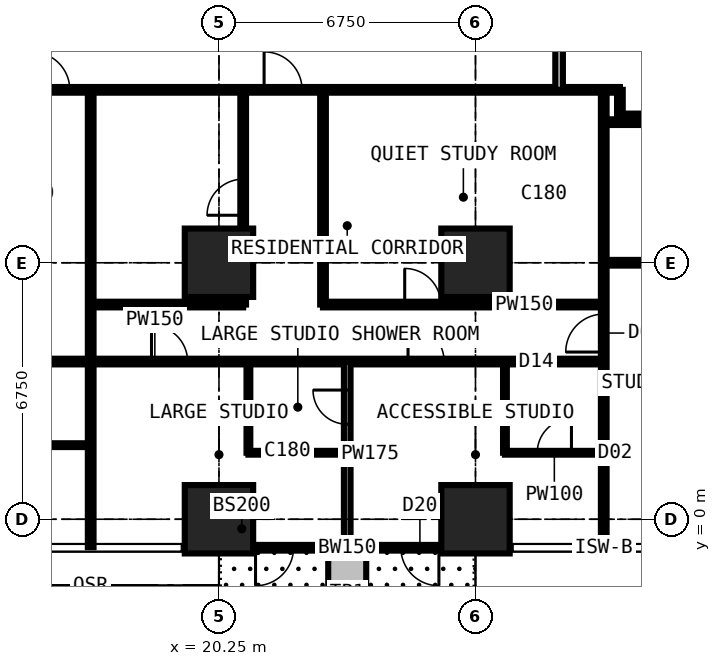
"""IFC4 building model, lengths in metres.
Left out: names, types, materials, properties, quantities, classifications, styles, units other than length and angle.
Written with IfcOpenShell. Run it as: python <this file> out.ifc"""

import sys

from ifc_helpers import new_model, si_unit, direction, frame, frame_2d, origin, origin_2d, place, context, subcontext, project, spatial, rectangle, extrude, element, fill, save


model = new_model("IFC4")
c1 = context("Model", 3, precision=1e-05, world=origin(), true_north=direction((0.0, 1.0)))
c2 = subcontext(c1, "Body", "Model", "MODEL_VIEW")
j1 = project(units=[si_unit("LENGTHUNIT", "METRE"), si_unit("PLANEANGLEUNIT", "RADIAN")], contexts=[c1])
p1 = place(None, origin())
s1 = spatial("IfcSite", under=j1, at=p1, CompositionType="ELEMENT")
p2 = place(p1, origin())
s2 = spatial("IfcBuilding", under=s1, at=p2, CompositionType="ELEMENT")
p3 = place(p2, frame((0.0, 0.0, 98.1)))
s3 = spatial("IfcBuildingStorey", under=s2, at=p3, CompositionType="ELEMENT", Elevation=98.1)
for number, where, z_axis, x_axis in (
    (1, (20.25, 0.0, 0.0), (0.0, 0.0, 1.0), (1.0, 0.0, 0.0)),
    (2, (20.25, 6.75, 0.0), (0.0, 0.0, 1.0), (1.0, 0.0, 0.0)),
    (3, (27.0, 0.0, 0.0), (0.0, 0.0, 1.0), (1.0, 0.0, 0.0)),
    (4, (27.0, 6.75, 0.0), (0.0, 0.0, 1.0), (1.0, 0.0, 0.0)),
):
    element("IfcColumn", number, at=place(p3, frame(where, z_axis=z_axis, x_axis=x_axis)), inside=s3, PredefinedType="COLUMN", context=c2, shape_type="SweptSolid", body=[
        extrude(rectangle(XDim=1.8, YDim=1.8, at=origin_2d()), origin(), (0.0, 0.0, 1.0), 3.6),
    ])
p4 = place(p3, frame((27.0, -0.75, 0.0), z_axis=(0.0, 0.0, 1.0), x_axis=(-1.0, 0.0, 0.0)))
e5 = element("IfcWall", 5, at=p4, inside=s3, PredefinedType="SOLIDWALL", context=c2, shape_type="SweptSolid", body=[
    extrude(rectangle(XDim=6.75, YDim=0.15, at=frame_2d((3.375, 0.0))), origin(), (0.0, 0.0, 1.0), 3.375),
])
p5 = place(p4, frame((0.962, 0.0, 0.0)))
e6 = element("IfcOpeningElement", 6, at=p5, cuts=e5, PredefinedType="OPENING", context=c2, shape_type="SweptSolid", body=[
    extrude(rectangle(XDim=1.0, YDim=2.2, at=frame_2d((0.5, 1.1))), frame((0.0, 0.085, 0.0), z_axis=(0.0, -1.0, 0.0), x_axis=(1.0, 0.0, 0.0)), (0.0, 0.0, 1.0), 0.17),
])
p6 = place(p4, frame((2.025, 0.0, 0.9)))
e7 = element("IfcOpeningElement", 7, at=p6, cuts=e5, PredefinedType="OPENING", context=c2, shape_type="SweptSolid", body=[
    extrude(rectangle(XDim=1.2, YDim=1.8, at=frame_2d((0.6, 0.9))), frame((0.0, 0.085, 0.0), z_axis=(0.0, -1.0, 0.0), x_axis=(1.0, 0.0, 0.0)), (0.0, 0.0, 1.0), 0.17),
])
p7 = place(p4, frame((4.788, 0.0, 0.0)))
e8 = element("IfcOpeningElement", 8, at=p7, cuts=e5, PredefinedType="OPENING", context=c2, shape_type="SweptSolid", body=[
    extrude(rectangle(XDim=1.0, YDim=2.2, at=frame_2d((0.5, 1.1))), frame((0.0, 0.085, 0.0), z_axis=(0.0, -1.0, 0.0), x_axis=(1.0, 0.0, 0.0)), (0.0, 0.0, 1.0), 0.17),
])
p8 = place(p4, frame((3.525, 0.0, 0.9)))
e9 = element("IfcOpeningElement", 9, at=p8, cuts=e5, PredefinedType="OPENING", context=c2, shape_type="SweptSolid", body=[
    extrude(rectangle(XDim=1.2, YDim=1.8, at=frame_2d((0.6, 0.9))), frame((0.0, 0.085, 0.0), z_axis=(0.0, -1.0, 0.0), x_axis=(1.0, 0.0, 0.0)), (0.0, 0.0, 1.0), 0.17),
])
p9 = place(p3, frame((23.625, -0.85, 0.0), z_axis=(0.0, 0.0, 1.0), x_axis=(0.0, -1.0, 0.0)))
e10 = element("IfcWall", 10, at=p9, inside=s3, PredefinedType="USERDEFINED", context=c2, shape_type="SweptSolid", body=[
    extrude(rectangle(XDim=2.2, YDim=1.0, at=frame_2d((1.1, 0.0))), origin(), (0.0, 0.0, 1.0), 0.9),
])
p10 = place(p3, frame((6.75, 4.15, 0.0), z_axis=(0.0, 0.0, 1.0), x_axis=(1.0, 0.0, 0.0)))
e11 = element("IfcWall", 11, at=p10, inside=s3, PredefinedType="PARTITIONING", context=c2, shape_type="SweptSolid", body=[
    extrude(rectangle(XDim=23.625, YDim=0.15, at=frame_2d((11.812, 0.0))), origin(), (0.0, 0.0, 1.0), 3.375),
])
p11 = place(p10, frame((1.2, 0.0, 0.0)))
e12 = element("IfcOpeningElement", 12, at=p11, cuts=e11, PredefinedType="OPENING", context=c2, shape_type="SweptSolid", body=[
    extrude(rectangle(XDim=1.0, YDim=2.2, at=frame_2d((0.5, 1.1))), frame((0.0, 0.085, 0.0), z_axis=(0.0, -1.0, 0.0), x_axis=(1.0, 0.0, 0.0)), (0.0, 0.0, 1.0), 0.17),
])
p12 = place(p10, frame((3.575, 0.0, 0.0)))
e13 = element("IfcOpeningElement", 13, at=p12, cuts=e11, PredefinedType="OPENING", context=c2, shape_type="SweptSolid", body=[
    extrude(rectangle(XDim=0.95, YDim=2.2, at=frame_2d((0.475, 1.1))), frame((0.0, 0.085, 0.0), z_axis=(0.0, -1.0, 0.0), x_axis=(1.0, 0.0, 0.0)), (0.0, 0.0, 1.0), 0.17),
])
p13 = place(p10, frame((7.0, 0.0, 0.0)))
e14 = element("IfcOpeningElement", 14, at=p13, cuts=e11, PredefinedType="OPENING", context=c2, shape_type="SweptSolid", body=[
    extrude(rectangle(XDim=0.95, YDim=2.2, at=frame_2d((0.475, 1.1))), frame((0.0, 0.085, 0.0), z_axis=(0.0, -1.0, 0.0), x_axis=(1.0, 0.0, 0.0)), (0.0, 0.0, 1.0), 0.17),
])
p14 = place(p10, frame((18.475, 0.0, 0.0)))
e15 = element("IfcOpeningElement", 15, at=p14, cuts=e11, PredefinedType="OPENING", context=c2, shape_type="SweptSolid", body=[
    extrude(rectangle(XDim=0.95, YDim=2.2, at=frame_2d((0.475, 1.1))), frame((0.0, 0.085, 0.0), z_axis=(0.0, -1.0, 0.0), x_axis=(1.0, 0.0, 0.0)), (0.0, 0.0, 1.0), 0.17),
])
p15 = place(p10, frame((11.725, 0.0, 0.0)))
e16 = element("IfcOpeningElement", 16, at=p15, cuts=e11, PredefinedType="OPENING", context=c2, shape_type="SweptSolid", body=[
    extrude(rectangle(XDim=0.95, YDim=2.2, at=frame_2d((0.475, 1.1))), frame((0.0, 0.085, 0.0), z_axis=(0.0, -1.0, 0.0), x_axis=(1.0, 0.0, 0.0)), (0.0, 0.0, 1.0), 0.17),
])
p16 = place(p3, frame((10.125, 11.3, 0.0), z_axis=(0.0, 0.0, 1.0), x_axis=(1.0, 0.0, 0.0)))
e17 = element("IfcWall", 17, at=p16, inside=s3, PredefinedType="PARTITIONING", context=c2, shape_type="SweptSolid", body=[
    extrude(rectangle(XDim=20.675, YDim=0.15, at=frame_2d((10.337, 0.0))), origin(), (0.0, 0.0, 1.0), 3.375),
])
p17 = place(p16, frame((5.2, 0.0, 0.0)))
e18 = element("IfcOpeningElement", 18, at=p17, cuts=e17, PredefinedType="OPENING", context=c2, shape_type="SweptSolid", body=[
    extrude(rectangle(XDim=1.0, YDim=2.2, at=frame_2d((0.5, 1.1))), frame((0.0, 0.085, 0.0), z_axis=(0.0, -1.0, 0.0), x_axis=(1.0, 0.0, 0.0)), (0.0, 0.0, 1.0), 0.17),
])
p18 = place(p16, frame((11.312, 0.0, 0.0)))
e19 = element("IfcOpeningElement", 19, at=p18, cuts=e17, PredefinedType="OPENING", context=c2, shape_type="SweptSolid", body=[
    extrude(rectangle(XDim=1.0, YDim=2.2, at=frame_2d((0.5, 1.1))), frame((0.0, 0.085, 0.0), z_axis=(0.0, -1.0, 0.0), x_axis=(1.0, 0.0, 0.0)), (0.0, 0.0, 1.0), 0.17),
])
p19 = place(p16, frame((3.225, 0.0, 0.0)))
e20 = element("IfcOpeningElement", 20, at=p19, cuts=e17, PredefinedType="OPENING", context=c2, shape_type="SweptSolid", body=[
    extrude(rectangle(XDim=0.95, YDim=2.2, at=frame_2d((0.475, 1.1))), frame((0.0, 0.085, 0.0), z_axis=(0.0, -1.0, 0.0), x_axis=(1.0, 0.0, 0.0)), (0.0, 0.0, 1.0), 0.17),
])
p20 = place(p3, frame((14.875, 1.95, 0.0), z_axis=(0.0, 0.0, 1.0), x_axis=(1.0, 0.0, 0.0)))
e21 = element("IfcWall", 21, at=p20, inside=s3, PredefinedType="PARTITIONING", context=c2, shape_type="SweptSolid", body=[
    extrude(rectangle(XDim=2.0, YDim=0.1, at=frame_2d((1.0, 0.0))), origin(), (0.0, 0.0, 1.0), 3.375),
])
p21 = place(p3, frame((16.875, -0.734, 0.0), z_axis=(0.0, 0.0, 1.0), x_axis=(0.0, 1.0, 0.0)))
e22 = element("IfcWall", 22, at=p21, inside=s3, PredefinedType="PARTITIONING", context=c2, shape_type="SweptSolid", body=[
    extrude(rectangle(XDim=12.034, YDim=0.15, at=frame_2d((6.017, 0.0))), origin(), (0.0, 0.0, 1.0), 3.375),
])
p22 = place(p3, frame((16.875, 5.65, 0.0), z_axis=(0.0, 0.0, 1.0), x_axis=(1.0, 0.0, 0.0)))
e23 = element("IfcWall", 23, at=p22, inside=s3, PredefinedType="PARTITIONING", context=c2, shape_type="SweptSolid", body=[
    extrude(rectangle(XDim=4.012, YDim=0.15, at=frame_2d((2.006, 0.0))), origin(), (0.0, 0.0, 1.0), 3.375),
])
p23 = place(p3, frame((20.887, 5.65, 0.0), z_axis=(0.0, 0.0, 1.0), x_axis=(0.0, 1.0, 0.0)))
e24 = element("IfcWall", 24, at=p23, inside=s3, PredefinedType="PARTITIONING", context=c2, shape_type="SweptSolid", body=[
    extrude(rectangle(XDim=5.65, YDim=0.15, at=frame_2d((2.825, 0.0))), origin(), (0.0, 0.0, 1.0), 3.375),
])
p24 = place(p23, frame((2.35, 0.0, 0.0)))
e25 = element("IfcOpeningElement", 25, at=p24, cuts=e24, PredefinedType="OPENING", context=c2, shape_type="SweptSolid", body=[
    extrude(rectangle(XDim=0.95, YDim=2.2, at=frame_2d((0.475, 1.1))), frame((0.0, 0.085, 0.0), z_axis=(0.0, -1.0, 0.0), x_axis=(1.0, 0.0, 0.0)), (0.0, 0.0, 1.0), 0.17),
])
p25 = place(p3, frame((21.025, 1.75, 0.0), z_axis=(0.0, 0.0, 1.0), x_axis=(0.0, 1.0, 0.0)))
e26 = element("IfcWall", 26, at=p25, inside=s3, PredefinedType="PARTITIONING", context=c2, shape_type="SweptSolid", body=[
    extrude(rectangle(XDim=2.4, YDim=0.1, at=frame_2d((1.2, 0.0))), origin(), (0.0, 0.0, 1.0), 3.375),
])
p26 = place(p3, frame((21.025, 1.75, 0.0), z_axis=(0.0, 0.0, 1.0), x_axis=(1.0, 0.0, 0.0)))
e27 = element("IfcWall", 27, at=p26, inside=s3, PredefinedType="PARTITIONING", context=c2, shape_type="SweptSolid", body=[
    extrude(rectangle(XDim=2.6, YDim=0.1, at=frame_2d((1.3, 0.0))), origin(), (0.0, 0.0, 1.0), 3.375),
])
p27 = place(p3, frame((22.988, 5.65, 0.0), z_axis=(0.0, 0.0, 1.0), x_axis=(1.0, 0.0, 0.0)))
e28 = element("IfcWall", 28, at=p27, inside=s3, PredefinedType="PARTITIONING", context=c2, shape_type="SweptSolid", body=[
    extrude(rectangle(XDim=7.387, YDim=0.15, at=frame_2d((3.694, 0.0))), origin(), (0.0, 0.0, 1.0), 3.375),
])
p28 = place(p27, frame((2.15, 0.0, 0.0)))
e29 = element("IfcOpeningElement", 29, at=p28, cuts=e28, PredefinedType="OPENING", context=c2, shape_type="SweptSolid", body=[
    extrude(rectangle(XDim=0.95, YDim=2.2, at=frame_2d((0.475, 1.1))), frame((0.0, 0.085, 0.0), z_axis=(0.0, -1.0, 0.0), x_axis=(1.0, 0.0, 0.0)), (0.0, 0.0, 1.0), 0.17),
])
p29 = place(p3, frame((22.988, 5.65, 0.0), z_axis=(0.0, 0.0, 1.0), x_axis=(0.0, 1.0, 0.0)))
e30 = element("IfcWall", 30, at=p29, inside=s3, PredefinedType="PARTITIONING", context=c2, shape_type="SweptSolid", body=[
    extrude(rectangle(XDim=5.65, YDim=0.15, at=frame_2d((2.825, 0.0))), origin(), (0.0, 0.0, 1.0), 3.375),
])
p30 = place(p3, frame((23.625, -0.734, 0.0), z_axis=(0.0, 0.0, 1.0), x_axis=(0.0, 1.0, 0.0)))
e31 = element("IfcWall", 31, at=p30, inside=s3, PredefinedType="PARTITIONING", context=c2, shape_type="SweptSolid", body=[
    extrude(rectangle(XDim=4.884, YDim=0.175, at=frame_2d((2.442, 0.0))), origin(), (0.0, 0.0, 1.0), 3.375),
])
p31 = place(p30, frame((3.234, 0.0, 0.0)))
e32 = element("IfcOpeningElement", 32, at=p31, cuts=e31, PredefinedType="OPENING", context=c2, shape_type="SweptSolid", body=[
    extrude(rectangle(XDim=0.9, YDim=2.2, at=frame_2d((0.45, 1.1))), frame((0.0, 0.097, 0.0), z_axis=(0.0, -1.0, 0.0), x_axis=(1.0, 0.0, 0.0)), (0.0, 0.0, 1.0), 0.195),
])
p32 = place(p3, frame((27.775, 1.75, 0.0), z_axis=(0.0, 0.0, 1.0), x_axis=(0.0, 1.0, 0.0)))
e33 = element("IfcWall", 33, at=p32, inside=s3, PredefinedType="PARTITIONING", context=c2, shape_type="SweptSolid", body=[
    extrude(rectangle(XDim=2.4, YDim=0.1, at=frame_2d((1.2, 0.0))), origin(), (0.0, 0.0, 1.0), 3.375),
])
p33 = place(p3, frame((27.775, 1.75, 0.0), z_axis=(0.0, 0.0, 1.0), x_axis=(1.0, 0.0, 0.0)))
e34 = element("IfcWall", 34, at=p33, inside=s3, PredefinedType="PARTITIONING", context=c2, shape_type="SweptSolid", body=[
    extrude(rectangle(XDim=2.6, YDim=0.1, at=frame_2d((1.3, 0.0))), origin(), (0.0, 0.0, 1.0), 3.375),
])
p34 = place(p33, frame((0.85, 0.0, 0.0)))
e35 = element("IfcOpeningElement", 35, at=p34, cuts=e34, PredefinedType="OPENING", context=c2, shape_type="SweptSolid", body=[
    extrude(rectangle(XDim=0.9, YDim=2.2, at=frame_2d((0.45, 1.1))), frame((0.0, 0.06, 0.0), z_axis=(0.0, -1.0, 0.0), x_axis=(1.0, 0.0, 0.0)), (0.0, 0.0, 1.0), 0.12),
])
p35 = place(p3, frame((29.2, 11.3, 0.0), z_axis=(0.0, 0.0, 1.0), x_axis=(0.0, 1.0, 0.0)))
e36 = element("IfcWall", 36, at=p35, inside=s3, PredefinedType="PARTITIONING", context=c2, shape_type="SweptSolid", body=[
    extrude(rectangle(XDim=17.9, YDim=0.2, at=frame_2d((8.95, 0.0))), origin(), (0.0, 0.0, 1.0), 3.375),
])
p36 = place(p35, frame((8.35, 0.0, 0.0)))
e37 = element("IfcOpeningElement", 37, at=p36, cuts=e36, PredefinedType="OPENING", context=c2, shape_type="SweptSolid", body=[
    extrude(rectangle(XDim=1.2, YDim=2.2, at=frame_2d((0.6, 1.1))), frame((0.0, 0.11, 0.0), z_axis=(0.0, -1.0, 0.0), x_axis=(1.0, 0.0, 0.0)), (0.0, 0.0, 1.0), 0.22),
])
p37 = place(p3, frame((30.375, -0.734, 0.0), z_axis=(0.0, 0.0, 1.0), x_axis=(0.0, 1.0, 0.0)))
e38 = element("IfcWall", 38, at=p37, inside=s3, PredefinedType="PARTITIONING", context=c2, shape_type="SweptSolid", body=[
    extrude(rectangle(XDim=12.034, YDim=0.15, at=frame_2d((6.017, 0.0))), origin(), (0.0, 0.0, 1.0), 3.375),
])
p38 = place(p37, frame((5.134, 0.0, 0.0)))
e39 = element("IfcOpeningElement", 39, at=p38, cuts=e38, PredefinedType="OPENING", context=c2, shape_type="SweptSolid", body=[
    extrude(rectangle(XDim=1.0, YDim=2.2, at=frame_2d((0.5, 1.1))), frame((0.0, 0.085, 0.0), z_axis=(0.0, -1.0, 0.0), x_axis=(1.0, 0.0, 0.0)), (0.0, 0.0, 1.0), 0.17),
])
p39 = place(p3, frame((30.375, 6.75, 0.0), z_axis=(0.0, 0.0, 1.0), x_axis=(1.0, 0.0, 0.0)))
e40 = element("IfcWall", 40, at=p39, inside=s3, PredefinedType="PARTITIONING", context=c2, shape_type="SweptSolid", body=[
    extrude(rectangle(XDim=5.975, YDim=0.15, at=frame_2d((2.988, 0.0))), origin(), (0.0, 0.0, 1.0), 2.877),
])
p40 = place(p3, frame((30.375, 10.45, 0.0), z_axis=(0.0, 0.0, 1.0), x_axis=(1.0, 0.0, 0.0)))
e41 = element("IfcWall", 41, at=p40, inside=s3, PredefinedType="PARTITIONING", context=c2, shape_type="SweptSolid", body=[
    extrude(rectangle(XDim=4.475, YDim=0.15, at=frame_2d((2.238, 0.0))), origin(), (0.0, 0.0, 1.0), 3.375),
])
p41 = place(p40, frame((2.35, 0.0, 0.0)))
e42 = element("IfcOpeningElement", 42, at=p41, cuts=e41, PredefinedType="OPENING", context=c2, shape_type="SweptSolid", body=[
    extrude(rectangle(XDim=0.95, YDim=2.2, at=frame_2d((0.475, 1.1))), frame((0.0, 0.085, 0.0), z_axis=(0.0, -1.0, 0.0), x_axis=(1.0, 0.0, 0.0)), (0.0, 0.0, 1.0), 0.17),
])
p42 = place(p3, frame((30.8, 10.6, 0.0), z_axis=(0.0, 0.0, 1.0), x_axis=(0.0, 1.0, 0.0)))
e43 = element("IfcWall", 43, at=p42, inside=s3, PredefinedType="PARTITIONING", context=c2, shape_type="SweptSolid", body=[
    extrude(rectangle(XDim=0.7, YDim=0.15, at=frame_2d((0.35, 0.0))), origin(), (0.0, 0.0, 1.0), 3.375),
])
p43 = place(p3, frame((30.8, 10.6, 0.0), z_axis=(0.0, 0.0, 1.0), x_axis=(1.0, 0.0, 0.0)))
e44 = element("IfcWall", 44, at=p43, inside=s3, PredefinedType="PARTITIONING", context=c2, shape_type="SweptSolid", body=[
    extrude(rectangle(XDim=1.85, YDim=0.15, at=frame_2d((0.925, 0.0))), origin(), (0.0, 0.0, 1.0), 3.375),
])
p44 = place(p5, origin())
e45 = element("IfcDoor", 45, at=p44, inside=s3, OperationType="SINGLE_SWING_LEFT", PredefinedType="DOOR", context=c2, shape_type="SweptSolid", body=[
    extrude(rectangle(XDim=1.0, YDim=2.2, at=frame_2d((0.5, 1.1))), frame((0.0, 0.025, 0.0), z_axis=(0.0, -1.0, 0.0), x_axis=(1.0, 0.0, 0.0)), (0.0, 0.0, 1.0), 0.05),
])
fill(e6, e45)
p45 = place(p6, origin())
e46 = element("IfcWindow", 46, at=p45, inside=s3, PartitioningType="SINGLE_PANEL", PredefinedType="WINDOW", context=c2, shape_type="SweptSolid", body=[
    extrude(rectangle(XDim=1.2, YDim=1.8, at=frame_2d((0.6, 0.9))), frame((0.0, 0.03, 0.0), z_axis=(0.0, -1.0, 0.0), x_axis=(1.0, 0.0, 0.0)), (0.0, 0.0, 1.0), 0.06),
])
fill(e7, e46)
p46 = place(p7, origin())
e47 = element("IfcDoor", 47, at=p46, inside=s3, OperationType="SINGLE_SWING_RIGHT", PredefinedType="DOOR", context=c2, shape_type="SweptSolid", body=[
    extrude(rectangle(XDim=1.0, YDim=2.2, at=frame_2d((0.5, 1.1))), frame((0.0, 0.025, 0.0), z_axis=(0.0, -1.0, 0.0), x_axis=(1.0, 0.0, 0.0)), (0.0, 0.0, 1.0), 0.05),
])
fill(e8, e47)
p47 = place(p8, origin())
e48 = element("IfcWindow", 48, at=p47, inside=s3, PartitioningType="SINGLE_PANEL", PredefinedType="WINDOW", context=c2, shape_type="SweptSolid", body=[
    extrude(rectangle(XDim=1.2, YDim=1.8, at=frame_2d((0.6, 0.9))), frame((0.0, 0.03, 0.0), z_axis=(0.0, -1.0, 0.0), x_axis=(1.0, 0.0, 0.0)), (0.0, 0.0, 1.0), 0.06),
])
fill(e9, e48)
p48 = place(p17, origin())
e49 = element("IfcDoor", 49, at=p48, inside=s3, OperationType="SINGLE_SWING_LEFT", PredefinedType="DOOR", context=c2, shape_type="SweptSolid", body=[
    extrude(rectangle(XDim=1.0, YDim=2.2, at=frame_2d((0.5, 1.1))), frame((0.0, 0.025, 0.0), z_axis=(0.0, -1.0, 0.0), x_axis=(1.0, 0.0, 0.0)), (0.0, 0.0, 1.0), 0.05),
])
fill(e18, e49)
p49 = place(p14, origin())
e50 = element("IfcDoor", 50, at=p49, inside=s3, OperationType="SINGLE_SWING_LEFT", PredefinedType="DOOR", context=c2, shape_type="SweptSolid", body=[
    extrude(rectangle(XDim=0.95, YDim=2.2, at=frame_2d((0.475, 1.1))), frame((0.0, 0.025, 0.0), z_axis=(0.0, -1.0, 0.0), x_axis=(1.0, 0.0, 0.0)), (0.0, 0.0, 1.0), 0.05),
])
fill(e15, e50)
p50 = place(p34, origin())
e51 = element("IfcDoor", 51, at=p50, inside=s3, OperationType="SINGLE_SWING_RIGHT", PredefinedType="DOOR", context=c2, shape_type="SweptSolid", body=[
    extrude(rectangle(XDim=0.9, YDim=2.2, at=frame_2d((0.45, 1.1))), frame((0.0, 0.025, 0.0), z_axis=(0.0, -1.0, 0.0), x_axis=(1.0, 0.0, 0.0)), (0.0, 0.0, 1.0), 0.05),
])
fill(e35, e51)
p51 = place(p15, origin())
e52 = element("IfcDoor", 52, at=p51, inside=s3, OperationType="SINGLE_SWING_LEFT", PredefinedType="DOOR", context=c2, shape_type="SweptSolid", body=[
    extrude(rectangle(XDim=0.95, YDim=2.2, at=frame_2d((0.475, 1.1))), frame((0.0, 0.025, 0.0), z_axis=(0.0, -1.0, 0.0), x_axis=(1.0, 0.0, 0.0)), (0.0, 0.0, 1.0), 0.05),
])
fill(e16, e52)
p52 = place(p31, origin())
e53 = element("IfcDoor", 53, at=p52, inside=s3, OperationType="SINGLE_SWING_RIGHT", PredefinedType="DOOR", context=c2, shape_type="SweptSolid", body=[
    extrude(rectangle(XDim=0.9, YDim=2.2, at=frame_2d((0.45, 1.1))), frame((0.0, 0.025, 0.0), z_axis=(0.0, -1.0, 0.0), x_axis=(1.0, 0.0, 0.0)), (0.0, 0.0, 1.0), 0.05),
])
fill(e32, e53)
p53 = place(p18, origin())
e54 = element("IfcDoor", 54, at=p53, inside=s3, OperationType="SINGLE_SWING_LEFT", PredefinedType="DOOR", context=c2, shape_type="SweptSolid", body=[
    extrude(rectangle(XDim=1.0, YDim=2.2, at=frame_2d((0.5, 1.1))), frame((0.0, 0.025, 0.0), z_axis=(0.0, -1.0, 0.0), x_axis=(1.0, 0.0, 0.0)), (0.0, 0.0, 1.0), 0.05),
])
fill(e19, e54)
p54 = place(p28, origin())
e55 = element("IfcDoor", 55, at=p54, inside=s3, OperationType="SINGLE_SWING_LEFT", PredefinedType="DOOR", context=c2, shape_type="SweptSolid", body=[
    extrude(rectangle(XDim=0.95, YDim=2.2, at=frame_2d((0.475, 1.1))), frame((0.0, 0.025, 0.0), z_axis=(0.0, -1.0, 0.0), x_axis=(1.0, 0.0, 0.0)), (0.0, 0.0, 1.0), 0.05),
])
fill(e29, e55)
p55 = place(p24, origin())
e56 = element("IfcDoor", 56, at=p55, inside=s3, OperationType="SINGLE_SWING_LEFT", PredefinedType="DOOR", context=c2, shape_type="SweptSolid", body=[
    extrude(rectangle(XDim=0.95, YDim=2.2, at=frame_2d((0.475, 1.1))), frame((0.0, 0.025, 0.0), z_axis=(0.0, -1.0, 0.0), x_axis=(1.0, 0.0, 0.0)), (0.0, 0.0, 1.0), 0.05),
])
fill(e25, e56)
p56 = place(p38, origin())
e57 = element("IfcDoor", 57, at=p56, inside=s3, OperationType="SINGLE_SWING_LEFT", PredefinedType="DOOR", context=c2, shape_type="SweptSolid", body=[
    extrude(rectangle(XDim=1.0, YDim=2.2, at=frame_2d((0.5, 1.1))), frame((0.0, 0.025, 0.0), z_axis=(0.0, -1.0, 0.0), x_axis=(1.0, 0.0, 0.0)), (0.0, 0.0, 1.0), 0.05),
])
fill(e39, e57)
save(model, sys.argv[1])
